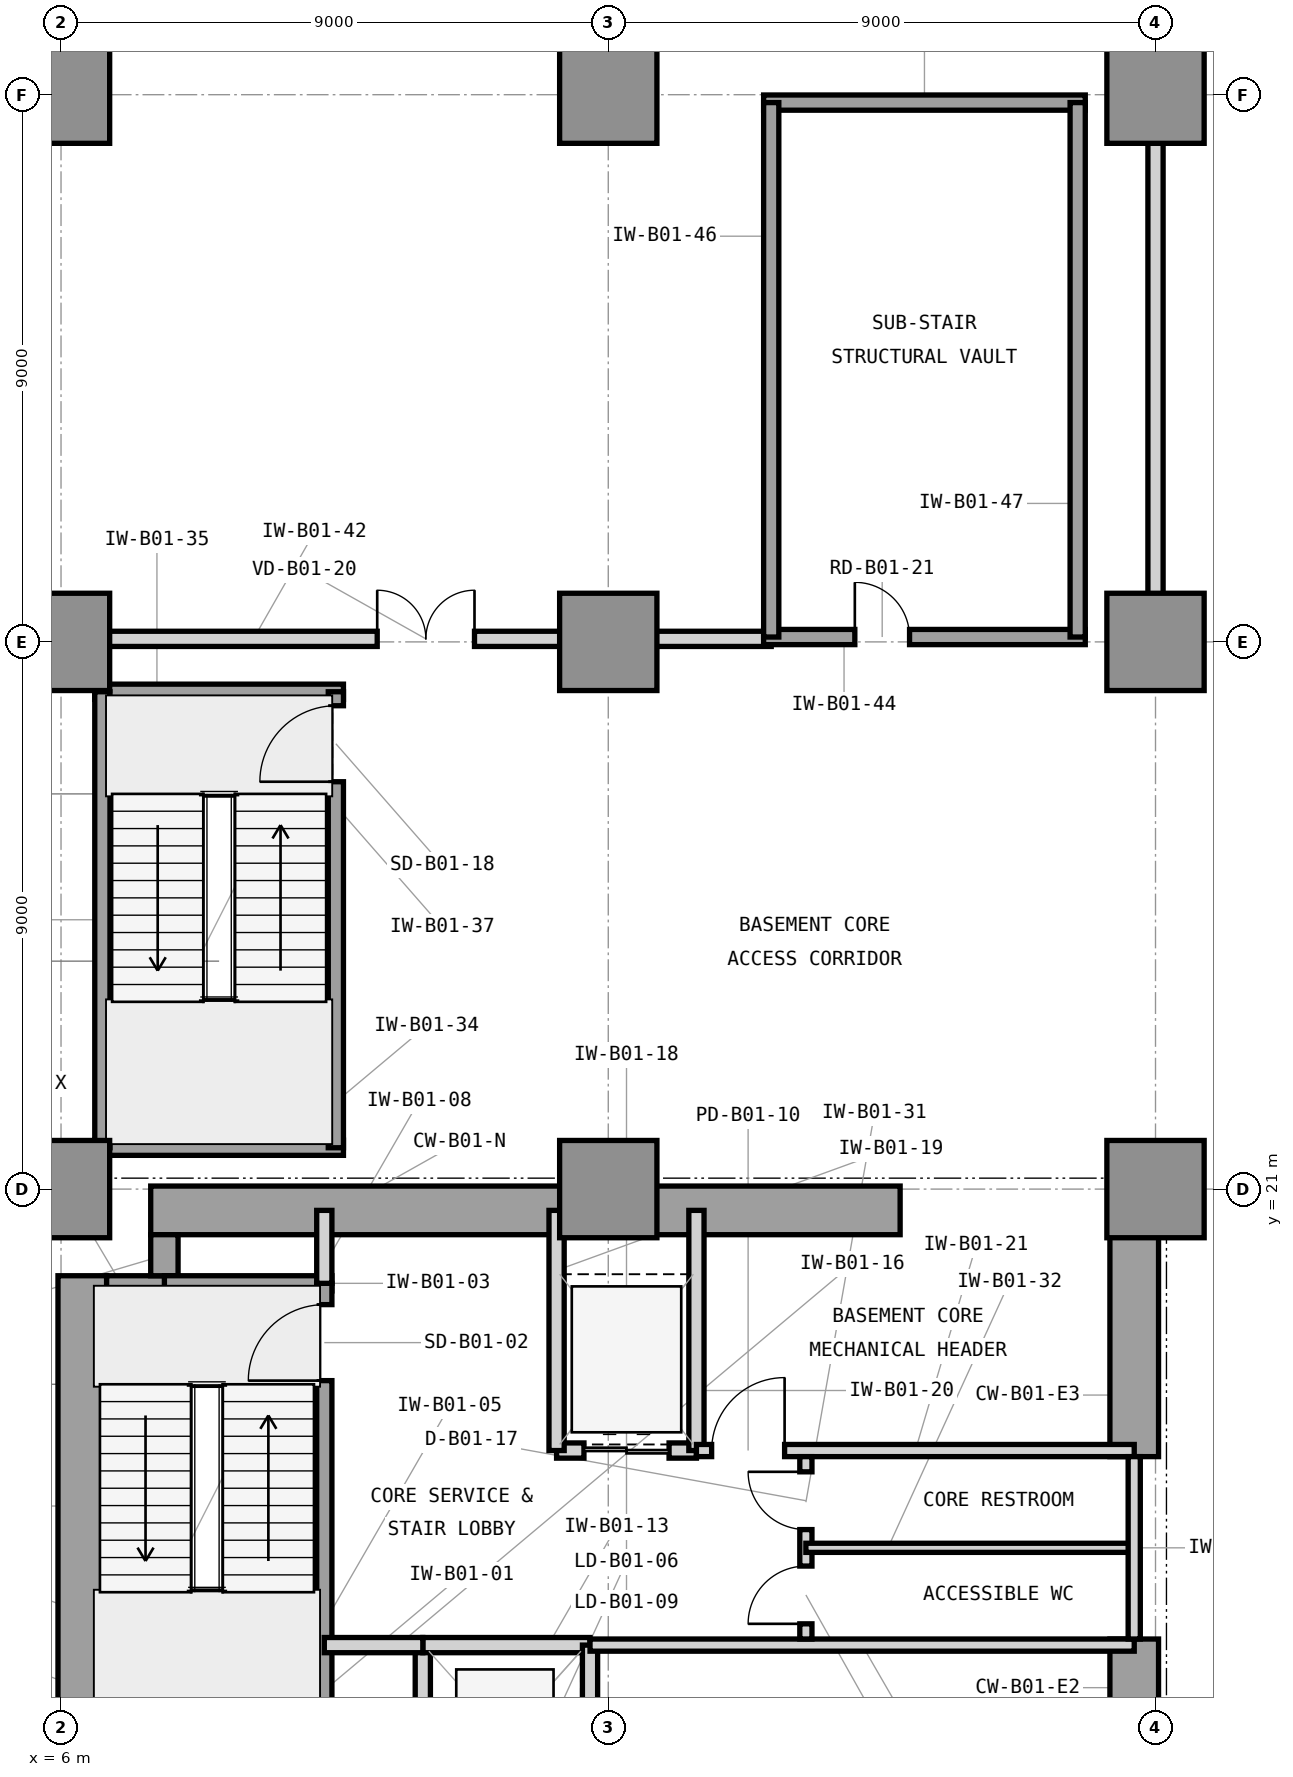
"""IFC4 building model, lengths in metres.
Left out: names, types, materials, properties, quantities, classifications, styles, units other than length and angle.
Written with IfcOpenShell. Run it as: python <this file> out.ifc"""

import sys

from ifc_helpers import new_model, si_unit, direction, frame, frame_2d, origin, origin_2d, place, context, subcontext, project, spatial, rectangle, extrude, element, fill, save


model = new_model("IFC4")
c1 = context("Model", 3, precision=1e-05, world=origin(), true_north=direction((0.0, 1.0)))
c2 = subcontext(c1, "Body", "Model", "MODEL_VIEW")
j1 = project(units=[si_unit("LENGTHUNIT", "METRE"), si_unit("PLANEANGLEUNIT", "RADIAN")], contexts=[c1])
p1 = place(None, origin())
s1 = spatial("IfcSite", under=j1, at=p1, CompositionType="ELEMENT")
p2 = place(p1, origin())
s2 = spatial("IfcBuilding", under=s1, at=p2, CompositionType="ELEMENT")
p3 = place(p2, frame((0.0, 0.0, -4.5)))
s3 = spatial("IfcBuildingStorey", under=s2, at=p3, CompositionType="ELEMENT", Elevation=-4.5)
p4 = place(p3, frame((6.35, 4.425, 0.0), z_axis=(0.0, 0.0, 1.0), x_axis=(0.0, 1.0, 0.0)))
e1 = element("IfcWall", 1, at=p4, inside=s3, PredefinedType="SHEAR", context=c2, shape_type="SweptSolid", body=[
    extrude(rectangle(XDim=15.15, YDim=0.8, at=frame_2d((7.575, 0.0))), origin(), (0.0, 0.0, 1.0), 4.5),
])
p5 = place(p3, frame((7.475, 20.65, 0.0), z_axis=(0.0, 0.0, 1.0), x_axis=(1.0, 0.0, 0.0)))
e2 = element("IfcWall", 2, at=p5, inside=s3, PredefinedType="SHEAR", context=c2, shape_type="SweptSolid", body=[
    extrude(rectangle(XDim=12.325, YDim=0.8, at=frame_2d((6.163, 0.0))), origin(), (0.0, 0.0, 1.0), 4.5),
])
p6 = place(p3, frame((23.65, 10.4, 0.0), z_axis=(0.0, 0.0, 1.0), x_axis=(0.0, 1.0, 0.0)))
e3 = element("IfcWall", 3, at=p6, inside=s3, PredefinedType="SHEAR", context=c2, shape_type="SweptSolid", body=[
    extrude(rectangle(XDim=3.2, YDim=0.8, at=frame_2d((1.6, 0.0))), origin(), (0.0, 0.0, 1.0), 4.5),
])
p7 = place(p3, frame((23.65, 16.6, 0.0), z_axis=(0.0, 0.0, 1.0), x_axis=(0.0, 1.0, 0.0)))
e4 = element("IfcWall", 4, at=p7, inside=s3, PredefinedType="SHEAR", context=c2, shape_type="SweptSolid", body=[
    extrude(rectangle(XDim=4.05, YDim=0.8, at=frame_2d((2.025, 0.0))), origin(), (0.0, 0.0, 1.0), 4.5),
])
p8 = place(p3, frame((6.75, 19.35, 0.0), z_axis=(0.0, 0.0, 1.0), x_axis=(1.0, 0.0, 0.0)))
e5 = element("IfcWall", 5, at=p8, inside=s3, PredefinedType="SHEAR", context=c2, shape_type="SweptSolid", body=[
    extrude(rectangle(XDim=1.175, YDim=0.45, at=frame_2d((0.587, 0.0))), origin(), (0.0, 0.0, 1.0), 4.5),
])
p9 = place(p3, frame((7.7, 19.575, 0.0), z_axis=(0.0, 0.0, 1.0), x_axis=(0.0, 1.0, 0.0)))
e6 = element("IfcWall", 6, at=p9, inside=s3, PredefinedType="SHEAR", context=c2, shape_type="SweptSolid", body=[
    extrude(rectangle(XDim=0.675, YDim=0.45, at=frame_2d((0.337, 0.0))), origin(), (0.0, 0.0, 1.0), 4.5),
])
for number, where, z_axis, x_axis in (
    (7, (6.0, 21.0, 0.0), (0.0, 0.0, 1.0), (1.0, 0.0, 0.0)),
    (8, (6.0, 30.0, 0.0), (0.0, 0.0, 1.0), (1.0, 0.0, 0.0)),
    (9, (6.0, 39.0, 0.0), (0.0, 0.0, 1.0), (1.0, 0.0, 0.0)),
    (10, (15.0, 21.0, 0.0), (0.0, 0.0, 1.0), (1.0, 0.0, 0.0)),
    (11, (15.0, 30.0, 0.0), (0.0, 0.0, 1.0), (1.0, 0.0, 0.0)),
    (12, (15.0, 39.0, 0.0), (0.0, 0.0, 1.0), (1.0, 0.0, 0.0)),
    (13, (24.0, 21.0, 0.0), (0.0, 0.0, 1.0), (1.0, 0.0, 0.0)),
    (14, (24.0, 30.0, 0.0), (0.0, 0.0, 1.0), (1.0, 0.0, 0.0)),
    (15, (24.0, 39.0, 0.0), (0.0, 0.0, 1.0), (1.0, 0.0, 0.0)),
):
    element("IfcColumn", number, at=place(p3, frame(where, z_axis=z_axis, x_axis=x_axis)), inside=s3, PredefinedType="COLUMN", context=c2, shape_type="SweptSolid", body=[
        extrude(rectangle(XDim=1.6, YDim=1.6, at=origin_2d()), origin(), (0.0, 0.0, 1.0), 4.5),
    ])
p10 = place(p3, frame((7.7, 19.45, 0.0), z_axis=(0.0, 0.0, 1.0), x_axis=(1.0, 0.0, 0.0)))
e16 = element("IfcWall", 16, at=p10, inside=s3, PredefinedType="SHEAR", context=c2, shape_type="SweptSolid", body=[
    extrude(rectangle(XDim=2.755, YDim=0.25, at=frame_2d((1.377, 0.0))), origin(), (0.0, 0.0, 1.0), 4.5),
])
p11 = place(p3, frame((10.33, 12.0, 0.0), z_axis=(0.0, 0.0, 1.0), x_axis=(0.0, 1.0, 0.0)))
e17 = element("IfcWall", 17, at=p11, inside=s3, PredefinedType="SHEAR", context=c2, shape_type="SweptSolid", body=[
    extrude(rectangle(XDim=7.45, YDim=0.25, at=frame_2d((3.725, 0.0))), origin(), (0.0, 0.0, 1.0), 4.5),
])
p12 = place(p11, frame((5.85, 0.0, 0.0)))
e18 = element("IfcOpeningElement", 18, at=p12, cuts=e17, PredefinedType="OPENING", context=c2, shape_type="SweptSolid", body=[
    extrude(rectangle(XDim=1.25, YDim=2.2, at=frame_2d((0.625, 1.1))), frame((0.0, 0.135, 0.0), z_axis=(0.0, -1.0, 0.0), x_axis=(1.0, 0.0, 0.0)), (0.0, 0.0, 1.0), 0.27),
])
p13 = place(p3, frame((10.33, 19.45, 0.0), z_axis=(0.0, 0.0, 1.0), x_axis=(0.0, 1.0, 0.0)))
e19 = element("IfcWall", 19, at=p13, inside=s3, PredefinedType="PARTITIONING", context=c2, shape_type="SweptSolid", body=[
    extrude(rectangle(XDim=1.2, YDim=0.25, at=frame_2d((0.6, 0.0))), origin(), (0.0, 0.0, 1.0), 3.334),
])
p14 = place(p3, frame((11.95, 10.5, 0.0), z_axis=(0.0, 0.0, 1.0), x_axis=(0.0, 1.0, 0.0)))
e20 = element("IfcWall", 20, at=p14, inside=s3, PredefinedType="PARTITIONING", context=c2, shape_type="SweptSolid", body=[
    extrude(rectangle(XDim=3.0, YDim=0.25, at=frame_2d((1.5, 0.0))), origin(), (0.0, 0.0, 1.0), 4.19),
])
p15 = place(p3, frame((11.95, 13.5, 0.0), z_axis=(0.0, 0.0, 1.0), x_axis=(1.0, 0.0, 0.0)))
e21 = element("IfcWall", 21, at=p15, inside=s3, PredefinedType="PARTITIONING", context=c2, shape_type="SweptSolid", body=[
    extrude(rectangle(XDim=2.75, YDim=0.25, at=frame_2d((1.375, 0.0))), origin(), (0.0, 0.0, 1.0), 3.573),
])
p16 = place(p3, frame((14.7, 10.5, 0.0), z_axis=(0.0, 0.0, 1.0), x_axis=(0.0, 1.0, 0.0)))
e22 = element("IfcWall", 22, at=p16, inside=s3, PredefinedType="PARTITIONING", context=c2, shape_type="SweptSolid", body=[
    extrude(rectangle(XDim=3.0, YDim=0.25, at=frame_2d((1.5, 0.0))), origin(), (0.0, 0.0, 1.0), 4.19),
])
p17 = place(p3, frame((10.33, 13.5, 0.0), z_axis=(0.0, 0.0, 1.0), x_axis=(1.0, 0.0, 0.0)))
e23 = element("IfcWall", 23, at=p17, inside=s3, PredefinedType="PARTITIONING", context=c2, shape_type="SweptSolid", body=[
    extrude(rectangle(XDim=1.62, YDim=0.25, at=frame_2d((0.81, 0.0))), origin(), (0.0, 0.0, 1.0), 3.573),
])
p18 = place(p3, frame((14.15, 16.7, 0.0), z_axis=(0.0, 0.0, 1.0), x_axis=(1.0, 0.0, 0.0)))
e24 = element("IfcWall", 24, at=p18, inside=s3, PredefinedType="PARTITIONING", context=c2, shape_type="SweptSolid", body=[
    extrude(rectangle(XDim=2.3, YDim=0.25, at=frame_2d((1.15, 0.0))), origin(), (0.0, 0.0, 1.0), 3.573),
])
p19 = place(p18, frame((0.45, 0.0, 0.0)))
e25 = element("IfcOpeningElement", 25, at=p19, cuts=e24, PredefinedType="OPENING", context=c2, shape_type="SweptSolid", body=[
    extrude(rectangle(XDim=1.4, YDim=2.35, at=frame_2d((0.7, 1.175))), frame((0.0, 0.135, 0.0), z_axis=(0.0, -1.0, 0.0), x_axis=(1.0, 0.0, 0.0)), (0.0, 0.0, 1.0), 0.27),
])
for number, where, z_axis, x_axis in (
    (26, (14.15, 16.7, 0.0), (0.0, 0.0, 1.0), (0.0, 1.0, 0.0)),
    (27, (16.45, 16.7, 0.0), (0.0, 0.0, 1.0), (0.0, 1.0, 0.0)),
):
    element("IfcWall", number, at=place(p3, frame(where, z_axis=z_axis, x_axis=x_axis)), inside=s3, PredefinedType="PARTITIONING", context=c2, shape_type="SweptSolid", body=[
        extrude(rectangle(XDim=3.95, YDim=0.25, at=frame_2d((1.975, 0.0))), origin(), (0.0, 0.0, 1.0), 4.19),
    ])
p20 = place(p3, frame((16.45, 16.7, 0.0), z_axis=(0.0, 0.0, 1.0), x_axis=(1.0, 0.0, 0.0)))
e28 = element("IfcWall", 28, at=p20, inside=s3, PredefinedType="PARTITIONING", context=c2, shape_type="SweptSolid", body=[
    extrude(rectangle(XDim=7.2, YDim=0.2, at=frame_2d((3.6, 0.0))), origin(), (0.0, 0.0, 1.0), 3.573),
])
p21 = place(p20, frame((0.25, 0.0, 0.0)))
e29 = element("IfcOpeningElement", 29, at=p21, cuts=e28, PredefinedType="OPENING", context=c2, shape_type="SweptSolid", body=[
    extrude(rectangle(XDim=1.2, YDim=2.2, at=frame_2d((0.6, 1.1))), frame((0.0, 0.11, 0.0), z_axis=(0.0, -1.0, 0.0), x_axis=(1.0, 0.0, 0.0)), (0.0, 0.0, 1.0), 0.22),
])
p22 = place(p3, frame((14.7, 13.5, 0.0), z_axis=(0.0, 0.0, 1.0), x_axis=(1.0, 0.0, 0.0)))
e30 = element("IfcWall", 30, at=p22, inside=s3, PredefinedType="PARTITIONING", context=c2, shape_type="SweptSolid", body=[
    extrude(rectangle(XDim=8.95, YDim=0.2, at=frame_2d((4.475, 0.0))), origin(), (0.0, 0.0, 1.0), 3.573),
])
p23 = place(p3, frame((18.25, 13.6, 0.0), z_axis=(0.0, 0.0, 1.0), x_axis=(0.0, 1.0, 0.0)))
e31 = element("IfcWall", 31, at=p23, inside=s3, PredefinedType="PARTITIONING", context=c2, shape_type="SweptSolid", body=[
    extrude(rectangle(XDim=3.0, YDim=0.2, at=frame_2d((1.5, 0.0))), origin(), (0.0, 0.0, 1.0), 4.19),
])
p24 = place(p23, frame((0.25, 0.0, 0.0)))
e32 = element("IfcOpeningElement", 32, at=p24, cuts=e31, PredefinedType="OPENING", context=c2, shape_type="SweptSolid", body=[
    extrude(rectangle(XDim=0.95, YDim=2.1, at=frame_2d((0.475, 1.05))), frame((0.0, 0.11, 0.0), z_axis=(0.0, -1.0, 0.0), x_axis=(1.0, 0.0, 0.0)), (0.0, 0.0, 1.0), 0.22),
])
p25 = place(p23, frame((1.8, 0.0, 0.0)))
e33 = element("IfcOpeningElement", 33, at=p25, cuts=e31, PredefinedType="OPENING", context=c2, shape_type="SweptSolid", body=[
    extrude(rectangle(XDim=0.95, YDim=2.1, at=frame_2d((0.475, 1.05))), frame((0.0, 0.11, 0.0), z_axis=(0.0, -1.0, 0.0), x_axis=(1.0, 0.0, 0.0)), (0.0, 0.0, 1.0), 0.22),
])
p26 = place(p3, frame((18.25, 15.1, 0.0), z_axis=(0.0, 0.0, 1.0), x_axis=(1.0, 0.0, 0.0)))
e34 = element("IfcWall", 34, at=p26, inside=s3, PredefinedType="PARTITIONING", context=c2, shape_type="SweptSolid", body=[
    extrude(rectangle(XDim=5.4, YDim=0.15, at=frame_2d((2.7, 0.0))), origin(), (0.0, 0.0, 1.0), 4.19),
])
p27 = place(p3, frame((23.65, 13.6, 0.0), z_axis=(0.0, 0.0, 1.0), x_axis=(0.0, 1.0, 0.0)))
e35 = element("IfcWall", 35, at=p27, inside=s3, PredefinedType="PARTITIONING", context=c2, shape_type="SweptSolid", body=[
    extrude(rectangle(XDim=3.0, YDim=0.2, at=frame_2d((1.5, 0.0))), origin(), (0.0, 0.0, 1.0), 4.19),
])
for number, where, z_axis, x_axis in (
    (36, (6.555, 21.68, 0.0), (0.0, 0.0, 1.0), (1.0, 0.0, 0.0)),
    (37, (6.555, 29.18, 0.0), (0.0, 0.0, 1.0), (1.0, 0.0, 0.0)),
):
    element("IfcWall", number, at=place(p3, frame(where, z_axis=z_axis, x_axis=x_axis)), inside=s3, PredefinedType="SHEAR", context=c2, shape_type="SweptSolid", body=[
        extrude(rectangle(XDim=4.09, YDim=0.25, at=frame_2d((2.045, 0.0))), origin(), (0.0, 0.0, 1.0), 4.5),
    ])
p28 = place(p3, frame((6.68, 21.68, 0.0), z_axis=(0.0, 0.0, 1.0), x_axis=(0.0, 1.0, 0.0)))
e38 = element("IfcWall", 38, at=p28, inside=s3, PredefinedType="SHEAR", context=c2, shape_type="SweptSolid", body=[
    extrude(rectangle(XDim=7.5, YDim=0.25, at=frame_2d((3.75, 0.0))), origin(), (0.0, 0.0, 1.0), 4.5),
])
p29 = place(p3, frame((10.52, 21.68, 0.0), z_axis=(0.0, 0.0, 1.0), x_axis=(0.0, 1.0, 0.0)))
e39 = element("IfcWall", 39, at=p29, inside=s3, PredefinedType="SHEAR", context=c2, shape_type="SweptSolid", body=[
    extrude(rectangle(XDim=7.5, YDim=0.25, at=frame_2d((3.75, 0.0))), origin(), (0.0, 0.0, 1.0), 4.5),
])
p30 = place(p29, frame((6.02, 0.0, 0.0)))
e40 = element("IfcOpeningElement", 40, at=p30, cuts=e39, PredefinedType="OPENING", context=c2, shape_type="SweptSolid", body=[
    extrude(rectangle(XDim=1.25, YDim=2.2, at=frame_2d((0.625, 1.1))), frame((0.0, 0.135, 0.0), z_axis=(0.0, -1.0, 0.0), x_axis=(1.0, 0.0, 0.0)), (0.0, 0.0, 1.0), 0.27),
])
p31 = place(p3, frame((0.65, 30.05, 0.0), z_axis=(0.0, 0.0, 1.0), x_axis=(1.0, 0.0, 0.0)))
e41 = element("IfcWall", 41, at=p31, inside=s3, PredefinedType="PARTITIONING", context=c2, shape_type="SweptSolid", body=[
    extrude(rectangle(XDim=17.03, YDim=0.25, at=frame_2d((8.515, 0.0))), origin(), (0.0, 0.0, 1.0), 3.334),
])
p32 = place(p31, frame((10.55, 0.0, 0.0)))
e42 = element("IfcOpeningElement", 42, at=p32, cuts=e41, PredefinedType="OPENING", context=c2, shape_type="SweptSolid", body=[
    extrude(rectangle(XDim=1.6, YDim=2.3, at=frame_2d((0.8, 1.15))), frame((0.0, 0.135, 0.0), z_axis=(0.0, -1.0, 0.0), x_axis=(1.0, 0.0, 0.0)), (0.0, 0.0, 1.0), 0.27),
])
p33 = place(p3, frame((24.0, 30.05, 0.0), z_axis=(0.0, 0.0, 1.0), x_axis=(0.0, 1.0, 0.0)))
e43 = element("IfcWall", 43, at=p33, inside=s3, PredefinedType="PARTITIONING", context=c2, shape_type="SweptSolid", body=[
    extrude(rectangle(XDim=20.3, YDim=0.25, at=frame_2d((10.15, 0.0))), origin(), (0.0, 0.0, 1.0), 3.334),
])
p34 = place(p3, frame((17.555, 30.08, 0.0), z_axis=(0.0, 0.0, 1.0), x_axis=(1.0, 0.0, 0.0)))
e44 = element("IfcWall", 44, at=p34, inside=s3, PredefinedType="SHEAR", context=c2, shape_type="SweptSolid", body=[
    extrude(rectangle(XDim=5.29, YDim=0.25, at=frame_2d((2.645, 0.0))), origin(), (0.0, 0.0, 1.0), 4.5),
])
p35 = place(p34, frame((1.5, 0.0, 0.0)))
e45 = element("IfcOpeningElement", 45, at=p35, cuts=e44, PredefinedType="OPENING", context=c2, shape_type="SweptSolid", body=[
    extrude(rectangle(XDim=0.9, YDim=2.1, at=frame_2d((0.45, 1.05))), frame((0.0, 0.135, 0.0), z_axis=(0.0, -1.0, 0.0), x_axis=(1.0, 0.0, 0.0)), (0.0, 0.0, 1.0), 0.27),
])
p36 = place(p3, frame((17.555, 38.87, 0.0), z_axis=(0.0, 0.0, 1.0), x_axis=(1.0, 0.0, 0.0)))
e46 = element("IfcWall", 46, at=p36, inside=s3, PredefinedType="SHEAR", context=c2, shape_type="SweptSolid", body=[
    extrude(rectangle(XDim=5.29, YDim=0.25, at=frame_2d((2.645, 0.0))), origin(), (0.0, 0.0, 1.0), 4.5),
])
for number, where, z_axis, x_axis in (
    (47, (17.68, 30.08, 0.0), (0.0, 0.0, 1.0), (0.0, 1.0, 0.0)),
    (48, (22.72, 30.08, 0.0), (0.0, 0.0, 1.0), (0.0, 1.0, 0.0)),
):
    element("IfcWall", number, at=place(p3, frame(where, z_axis=z_axis, x_axis=x_axis)), inside=s3, PredefinedType="SHEAR", context=c2, shape_type="SweptSolid", body=[
        extrude(rectangle(XDim=8.79, YDim=0.25, at=frame_2d((4.395, 0.0))), origin(), (0.0, 0.0, 1.0), 4.5),
    ])
p37 = place(p12, origin())
e49 = element("IfcDoor", 49, at=p37, inside=s3, OperationType="SINGLE_SWING_LEFT", PredefinedType="DOOR", context=c2, shape_type="SweptSolid", body=[
    extrude(rectangle(XDim=1.25, YDim=2.2, at=frame_2d((0.625, 1.1))), frame((0.0, 0.025, 0.0), z_axis=(0.0, -1.0, 0.0), x_axis=(1.0, 0.0, 0.0)), (0.0, 0.0, 1.0), 0.05),
])
fill(e18, e49)
p38 = place(p19, origin())
e50 = element("IfcDoor", 50, at=p38, inside=s3, OperationType="DOUBLE_DOOR_SLIDING", PredefinedType="DOOR", context=c2, shape_type="SweptSolid", body=[
    extrude(rectangle(XDim=1.4, YDim=2.35, at=frame_2d((0.7, 1.175))), frame((0.0, 0.025, 0.0), z_axis=(0.0, -1.0, 0.0), x_axis=(1.0, 0.0, 0.0)), (0.0, 0.0, 1.0), 0.05),
])
fill(e25, e50)
p39 = place(p21, origin())
e51 = element("IfcDoor", 51, at=p39, inside=s3, OperationType="SINGLE_SWING_RIGHT", PredefinedType="DOOR", context=c2, shape_type="SweptSolid", body=[
    extrude(rectangle(XDim=1.2, YDim=2.2, at=frame_2d((0.6, 1.1))), frame((0.0, 0.025, 0.0), z_axis=(0.0, -1.0, 0.0), x_axis=(1.0, 0.0, 0.0)), (0.0, 0.0, 1.0), 0.05),
])
fill(e29, e51)
p40 = place(p24, origin())
e52 = element("IfcDoor", 52, at=p40, inside=s3, OperationType="SINGLE_SWING_LEFT", PredefinedType="DOOR", context=c2, shape_type="SweptSolid", body=[
    extrude(rectangle(XDim=0.95, YDim=2.1, at=frame_2d((0.475, 1.05))), frame((0.0, 0.025, 0.0), z_axis=(0.0, -1.0, 0.0), x_axis=(1.0, 0.0, 0.0)), (0.0, 0.0, 1.0), 0.05),
])
fill(e32, e52)
p41 = place(p25, origin())
e53 = element("IfcDoor", 53, at=p41, inside=s3, OperationType="SINGLE_SWING_RIGHT", PredefinedType="DOOR", context=c2, shape_type="SweptSolid", body=[
    extrude(rectangle(XDim=0.95, YDim=2.1, at=frame_2d((0.475, 1.05))), frame((0.0, 0.025, 0.0), z_axis=(0.0, -1.0, 0.0), x_axis=(1.0, 0.0, 0.0)), (0.0, 0.0, 1.0), 0.05),
])
fill(e33, e53)
p42 = place(p30, origin())
e54 = element("IfcDoor", 54, at=p42, inside=s3, OperationType="SINGLE_SWING_LEFT", PredefinedType="DOOR", context=c2, shape_type="SweptSolid", body=[
    extrude(rectangle(XDim=1.25, YDim=2.2, at=frame_2d((0.625, 1.1))), frame((0.0, 0.025, 0.0), z_axis=(0.0, -1.0, 0.0), x_axis=(1.0, 0.0, 0.0)), (0.0, 0.0, 1.0), 0.05),
])
fill(e40, e54)
p43 = place(p32, origin())
e55 = element("IfcDoor", 55, at=p43, inside=s3, OperationType="DOUBLE_DOOR_SINGLE_SWING", PredefinedType="DOOR", context=c2, shape_type="SweptSolid", body=[
    extrude(rectangle(XDim=1.6, YDim=2.3, at=frame_2d((0.8, 1.15))), frame((0.0, 0.025, 0.0), z_axis=(0.0, -1.0, 0.0), x_axis=(1.0, 0.0, 0.0)), (0.0, 0.0, 1.0), 0.05),
])
fill(e42, e55)
p44 = place(p35, origin())
e56 = element("IfcDoor", 56, at=p44, inside=s3, OperationType="SINGLE_SWING_LEFT", PredefinedType="TRAPDOOR", context=c2, shape_type="SweptSolid", body=[
    extrude(rectangle(XDim=0.9, YDim=2.1, at=frame_2d((0.45, 1.05))), frame((0.0, 0.025, 0.0), z_axis=(0.0, -1.0, 0.0), x_axis=(1.0, 0.0, 0.0)), (0.0, 0.0, 1.0), 0.05),
])
fill(e45, e56)
save(model, sys.argv[1])
